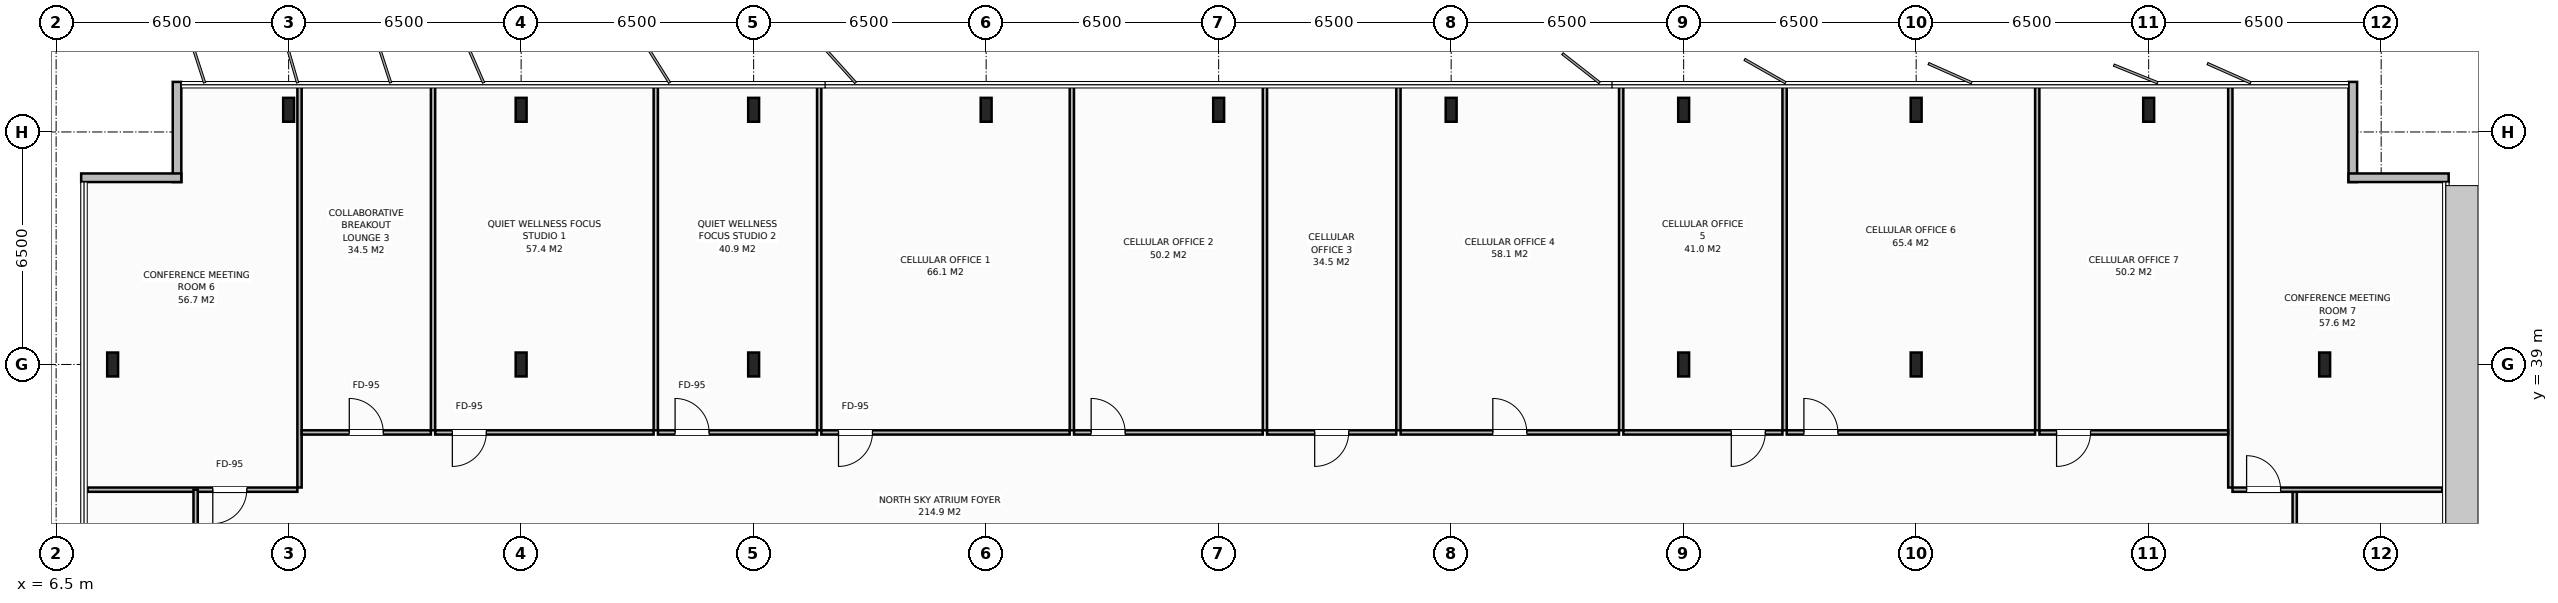
"""IFC4 building model, lengths in metres.
Left out: names, types, materials, properties, quantities, classifications, styles, units other than length and angle.
Written with IfcOpenShell. Run it as: python <this file> out.ifc"""

import sys

from ifc_helpers import new_model, si_unit, direction, frame, frame_2d, origin, origin_2d, place, context, subcontext, project, spatial, rectangle, i_section, extrude, element, fill, save


model = new_model("IFC4")
c1 = context("Model", 3, precision=1e-05, world=origin(), true_north=direction((0.0, 1.0)))
c2 = subcontext(c1, "Body", "Model", "MODEL_VIEW")
j1 = project(units=[si_unit("LENGTHUNIT", "METRE"), si_unit("PLANEANGLEUNIT", "RADIAN")], contexts=[c1])
p1 = place(None, origin())
s1 = spatial("IfcSite", under=j1, at=p1, CompositionType="ELEMENT")
p2 = place(p1, origin())
s2 = spatial("IfcBuilding", under=s1, at=p2, CompositionType="ELEMENT")
p3 = place(p2, frame((0.0, 0.0, 290.4)))
s3 = spatial("IfcBuildingStorey", under=s2, at=p3, CompositionType="ELEMENT", Elevation=290.4)
for number, where, z_axis, x_axis in (
    (1, (19.5, 39.0, 0.0), (0.0, 0.0, 1.0), (1.0, 0.0, 0.0)),
    (2, (58.5, 39.0, 0.0), (0.0, 0.0, 1.0), (1.0, 0.0, 0.0)),
    (3, (26.0, 39.0, 0.0), (0.0, 0.0, 1.0), (1.0, 0.0, 0.0)),
    (4, (52.0, 39.0, 0.0), (0.0, 0.0, 1.0), (1.0, 0.0, 0.0)),
    (5, (13.0, 46.12, 0.0), (0.0, 0.0, 1.0), (1.0, 0.0, 0.0)),
    (6, (19.5, 46.12, 0.0), (0.0, 0.0, 1.0), (1.0, 0.0, 0.0)),
    (7, (26.0, 46.12, 0.0), (0.0, 0.0, 1.0), (1.0, 0.0, 0.0)),
    (8, (32.5, 46.12, 0.0), (0.0, 0.0, 1.0), (1.0, 0.0, 0.0)),
    (9, (39.0, 46.12, 0.0), (0.0, 0.0, 1.0), (1.0, 0.0, 0.0)),
    (10, (45.5, 46.12, 0.0), (0.0, 0.0, 1.0), (1.0, 0.0, 0.0)),
    (11, (52.0, 46.12, 0.0), (0.0, 0.0, 1.0), (1.0, 0.0, 0.0)),
    (12, (58.5, 46.12, 0.0), (0.0, 0.0, 1.0), (1.0, 0.0, 0.0)),
    (13, (65.0, 46.12, 0.0), (0.0, 0.0, 1.0), (1.0, 0.0, 0.0)),
    (14, (8.08, 39.0, 0.0), (0.0, 0.0, 1.0), (1.0, 0.0, 0.0)),
    (15, (69.92, 39.0, 0.0), (0.0, 0.0, 1.0), (1.0, 0.0, 0.0)),
):
    element("IfcColumn", number, at=place(p3, frame(where, z_axis=z_axis, x_axis=x_axis)), inside=s3, PredefinedType="COLUMN", context=c2, shape_type="SweptSolid", body=[
        extrude(i_section(OverallWidth=0.305, OverallDepth=0.668, WebThickness=0.021, FlangeThickness=0.04, at=origin_2d()), origin(), (0.0, 0.0, 1.0), 4.0),
    ])
p4 = place(p3, frame((9.88, 44.1, 0.0), z_axis=(0.0, 0.0, 1.0), x_axis=(0.0, 1.0, 0.0)))
e16 = element("IfcWall", 16, at=p4, inside=s3, PredefinedType="STANDARD", context=c2, shape_type="SweptSolid", body=[
    extrude(rectangle(XDim=2.8, YDim=0.24, at=frame_2d((1.4, 0.0))), origin(), (0.0, 0.0, 1.0), 3.788),
])
p5 = place(p3, frame((7.2, 44.22, 0.0), z_axis=(0.0, 0.0, 1.0), x_axis=(1.0, 0.0, 0.0)))
e17 = element("IfcWall", 17, at=p5, inside=s3, PredefinedType="STANDARD", context=c2, shape_type="SweptSolid", body=[
    extrude(rectangle(XDim=2.8, YDim=0.24, at=frame_2d((1.4, 0.0))), origin(), (0.0, 0.0, 1.0), 3.788),
])
for number, where, z_axis, x_axis in (
    (18, (70.707, 46.9, 0.0), (0.0, 0.0, 1.0), (0.0, -1.0, 0.0)),
    (19, (70.587, 44.22, 0.0), (0.0, 0.0, 1.0), (1.0, 0.0, 0.0)),
):
    element("IfcWall", number, at=place(p3, frame(where, z_axis=z_axis, x_axis=x_axis)), inside=s3, PredefinedType="STANDARD", context=c2, shape_type="SweptSolid", body=[
        extrude(rectangle(XDim=2.8, YDim=0.24, at=frame_2d((1.4, 0.0))), origin(), (0.0, 0.0, 1.0), 3.788),
    ])
p6 = place(p3, frame((69.083, 33.4, 0.0), z_axis=(0.0, 0.0, 1.0), x_axis=(0.0, 1.0, 0.0)))
e20 = element("IfcWall", 20, at=p6, inside=s3, PredefinedType="PARTITIONING", context=c2, shape_type="SweptSolid", body=[
    extrude(rectangle(XDim=2.1, YDim=0.12, at=frame_2d((1.05, 0.0))), origin(), (0.0, 0.0, 1.0), 3.788),
])
p7 = place(p3, frame((13.304, 35.56, 0.0), z_axis=(0.0, 0.0, 1.0), x_axis=(0.0, 1.0, 0.0)))
e21 = element("IfcWall", 21, at=p7, inside=s3, PredefinedType="PARTITIONING", context=c2, shape_type="SweptSolid", body=[
    extrude(rectangle(XDim=11.32, YDim=0.12, at=frame_2d((5.66, 0.0))), origin(), (0.0, 0.0, 1.0), 3.788),
])
p8 = place(p3, frame((7.38, 35.5, 0.0), z_axis=(0.0, 0.0, 1.0), x_axis=(1.0, 0.0, 0.0)))
e22 = element("IfcWall", 22, at=p8, inside=s3, PredefinedType="PARTITIONING", context=c2, shape_type="SweptSolid", body=[
    extrude(rectangle(XDim=5.865, YDim=0.12, at=frame_2d((2.932, 0.0))), origin(), (0.0, 0.0, 1.0), 3.788),
])
p9 = place(p8, frame((3.5, 0.0, 0.0)))
e23 = element("IfcOpeningElement", 23, at=p9, cuts=e22, PredefinedType="OPENING", context=c2, shape_type="SweptSolid", body=[
    extrude(rectangle(XDim=0.95, YDim=2.15, at=frame_2d((0.475, 1.075))), frame((0.0, 0.07, 0.0), z_axis=(0.0, -1.0, 0.0), x_axis=(1.0, 0.0, 0.0)), (0.0, 0.0, 1.0), 0.14),
])
p10 = place(p3, frame((17.037, 37.16, 0.0), z_axis=(0.0, 0.0, 1.0), x_axis=(0.0, 1.0, 0.0)))
e24 = element("IfcWall", 24, at=p10, inside=s3, PredefinedType="PARTITIONING", context=c2, shape_type="SweptSolid", body=[
    extrude(rectangle(XDim=9.72, YDim=0.12, at=frame_2d((4.86, 0.0))), origin(), (0.0, 0.0, 1.0), 3.788),
])
p11 = place(p3, frame((13.365, 37.1, 0.0), z_axis=(0.0, 0.0, 1.0), x_axis=(1.0, 0.0, 0.0)))
e25 = element("IfcWall", 25, at=p11, inside=s3, PredefinedType="PARTITIONING", context=c2, shape_type="SweptSolid", body=[
    extrude(rectangle(XDim=3.612, YDim=0.12, at=frame_2d((1.806, 0.0))), origin(), (0.0, 0.0, 1.0), 3.788),
])
p12 = place(p11, frame((1.331, 0.0, 0.0)))
e26 = element("IfcOpeningElement", 26, at=p12, cuts=e25, PredefinedType="OPENING", context=c2, shape_type="SweptSolid", body=[
    extrude(rectangle(XDim=0.95, YDim=2.15, at=frame_2d((0.475, 1.075))), frame((0.0, 0.07, 0.0), z_axis=(0.0, -1.0, 0.0), x_axis=(1.0, 0.0, 0.0)), (0.0, 0.0, 1.0), 0.14),
])
p13 = place(p3, frame((23.264, 37.16, 0.0), z_axis=(0.0, 0.0, 1.0), x_axis=(0.0, 1.0, 0.0)))
e27 = element("IfcWall", 27, at=p13, inside=s3, PredefinedType="PARTITIONING", context=c2, shape_type="SweptSolid", body=[
    extrude(rectangle(XDim=9.72, YDim=0.12, at=frame_2d((4.86, 0.0))), origin(), (0.0, 0.0, 1.0), 3.788),
])
p14 = place(p3, frame((17.097, 37.1, 0.0), z_axis=(0.0, 0.0, 1.0), x_axis=(1.0, 0.0, 0.0)))
e28 = element("IfcWall", 28, at=p14, inside=s3, PredefinedType="PARTITIONING", context=c2, shape_type="SweptSolid", body=[
    extrude(rectangle(XDim=6.107, YDim=0.12, at=frame_2d((3.054, 0.0))), origin(), (0.0, 0.0, 1.0), 3.788),
])
p15 = place(p14, frame((0.48, 0.0, 0.0)))
e29 = element("IfcOpeningElement", 29, at=p15, cuts=e28, PredefinedType="OPENING", context=c2, shape_type="SweptSolid", body=[
    extrude(rectangle(XDim=0.95, YDim=2.15, at=frame_2d((0.475, 1.075))), frame((0.0, 0.07, 0.0), z_axis=(0.0, -1.0, 0.0), x_axis=(1.0, 0.0, 0.0)), (0.0, 0.0, 1.0), 0.14),
])
p16 = place(p3, frame((27.833, 37.16, 0.0), z_axis=(0.0, 0.0, 1.0), x_axis=(0.0, 1.0, 0.0)))
e30 = element("IfcWall", 30, at=p16, inside=s3, PredefinedType="PARTITIONING", context=c2, shape_type="SweptSolid", body=[
    extrude(rectangle(XDim=9.72, YDim=0.12, at=frame_2d((4.86, 0.0))), origin(), (0.0, 0.0, 1.0), 3.788),
])
p17 = place(p3, frame((23.324, 37.1, 0.0), z_axis=(0.0, 0.0, 1.0), x_axis=(1.0, 0.0, 0.0)))
e31 = element("IfcWall", 31, at=p17, inside=s3, PredefinedType="PARTITIONING", context=c2, shape_type="SweptSolid", body=[
    extrude(rectangle(XDim=4.448, YDim=0.12, at=frame_2d((2.224, 0.0))), origin(), (0.0, 0.0, 1.0), 3.788),
])
p18 = place(p17, frame((0.48, 0.0, 0.0)))
e32 = element("IfcOpeningElement", 32, at=p18, cuts=e31, PredefinedType="OPENING", context=c2, shape_type="SweptSolid", body=[
    extrude(rectangle(XDim=0.95, YDim=2.15, at=frame_2d((0.475, 1.075))), frame((0.0, 0.07, 0.0), z_axis=(0.0, -1.0, 0.0), x_axis=(1.0, 0.0, 0.0)), (0.0, 0.0, 1.0), 0.14),
])
p19 = place(p3, frame((34.896, 37.16, 0.0), z_axis=(0.0, 0.0, 1.0), x_axis=(0.0, 1.0, 0.0)))
e33 = element("IfcWall", 33, at=p19, inside=s3, PredefinedType="PARTITIONING", context=c2, shape_type="SweptSolid", body=[
    extrude(rectangle(XDim=9.72, YDim=0.12, at=frame_2d((4.86, 0.0))), origin(), (0.0, 0.0, 1.0), 3.788),
])
p20 = place(p3, frame((27.893, 37.1, 0.0), z_axis=(0.0, 0.0, 1.0), x_axis=(1.0, 0.0, 0.0)))
e34 = element("IfcWall", 34, at=p20, inside=s3, PredefinedType="PARTITIONING", context=c2, shape_type="SweptSolid", body=[
    extrude(rectangle(XDim=6.943, YDim=0.12, at=frame_2d((3.472, 0.0))), origin(), (0.0, 0.0, 1.0), 3.788),
])
p21 = place(p20, frame((0.48, 0.0, 0.0)))
e35 = element("IfcOpeningElement", 35, at=p21, cuts=e34, PredefinedType="OPENING", context=c2, shape_type="SweptSolid", body=[
    extrude(rectangle(XDim=0.95, YDim=2.15, at=frame_2d((0.475, 1.075))), frame((0.0, 0.07, 0.0), z_axis=(0.0, -1.0, 0.0), x_axis=(1.0, 0.0, 0.0)), (0.0, 0.0, 1.0), 0.14),
])
p22 = place(p3, frame((40.294, 37.16, 0.0), z_axis=(0.0, 0.0, 1.0), x_axis=(0.0, 1.0, 0.0)))
e36 = element("IfcWall", 36, at=p22, inside=s3, PredefinedType="PARTITIONING", context=c2, shape_type="SweptSolid", body=[
    extrude(rectangle(XDim=9.72, YDim=0.12, at=frame_2d((4.86, 0.0))), origin(), (0.0, 0.0, 1.0), 3.788),
])
p23 = place(p3, frame((34.956, 37.1, 0.0), z_axis=(0.0, 0.0, 1.0), x_axis=(1.0, 0.0, 0.0)))
e37 = element("IfcWall", 37, at=p23, inside=s3, PredefinedType="PARTITIONING", context=c2, shape_type="SweptSolid", body=[
    extrude(rectangle(XDim=5.278, YDim=0.12, at=frame_2d((2.639, 0.0))), origin(), (0.0, 0.0, 1.0), 3.788),
])
p24 = place(p23, frame((0.48, 0.0, 0.0)))
e38 = element("IfcOpeningElement", 38, at=p24, cuts=e37, PredefinedType="OPENING", context=c2, shape_type="SweptSolid", body=[
    extrude(rectangle(XDim=0.95, YDim=2.15, at=frame_2d((0.475, 1.075))), frame((0.0, 0.07, 0.0), z_axis=(0.0, -1.0, 0.0), x_axis=(1.0, 0.0, 0.0)), (0.0, 0.0, 1.0), 0.14),
])
p25 = place(p3, frame((44.026, 37.16, 0.0), z_axis=(0.0, 0.0, 1.0), x_axis=(0.0, 1.0, 0.0)))
e39 = element("IfcWall", 39, at=p25, inside=s3, PredefinedType="PARTITIONING", context=c2, shape_type="SweptSolid", body=[
    extrude(rectangle(XDim=9.72, YDim=0.12, at=frame_2d((4.86, 0.0))), origin(), (0.0, 0.0, 1.0), 3.788),
])
p26 = place(p3, frame((40.354, 37.1, 0.0), z_axis=(0.0, 0.0, 1.0), x_axis=(1.0, 0.0, 0.0)))
e40 = element("IfcWall", 40, at=p26, inside=s3, PredefinedType="PARTITIONING", context=c2, shape_type="SweptSolid", body=[
    extrude(rectangle(XDim=3.612, YDim=0.12, at=frame_2d((1.806, 0.0))), origin(), (0.0, 0.0, 1.0), 3.788),
])
p27 = place(p26, frame((1.331, 0.0, 0.0)))
e41 = element("IfcOpeningElement", 41, at=p27, cuts=e40, PredefinedType="OPENING", context=c2, shape_type="SweptSolid", body=[
    extrude(rectangle(XDim=0.95, YDim=2.15, at=frame_2d((0.475, 1.075))), frame((0.0, 0.07, 0.0), z_axis=(0.0, -1.0, 0.0), x_axis=(1.0, 0.0, 0.0)), (0.0, 0.0, 1.0), 0.14),
])
p28 = place(p3, frame((50.253, 37.16, 0.0), z_axis=(0.0, 0.0, 1.0), x_axis=(0.0, 1.0, 0.0)))
e42 = element("IfcWall", 42, at=p28, inside=s3, PredefinedType="PARTITIONING", context=c2, shape_type="SweptSolid", body=[
    extrude(rectangle(XDim=9.72, YDim=0.12, at=frame_2d((4.86, 0.0))), origin(), (0.0, 0.0, 1.0), 3.788),
])
p29 = place(p3, frame((44.086, 37.1, 0.0), z_axis=(0.0, 0.0, 1.0), x_axis=(1.0, 0.0, 0.0)))
e43 = element("IfcWall", 43, at=p29, inside=s3, PredefinedType="PARTITIONING", context=c2, shape_type="SweptSolid", body=[
    extrude(rectangle(XDim=6.107, YDim=0.12, at=frame_2d((3.054, 0.0))), origin(), (0.0, 0.0, 1.0), 3.788),
])
p30 = place(p29, frame((2.579, 0.0, 0.0)))
e44 = element("IfcOpeningElement", 44, at=p30, cuts=e43, PredefinedType="OPENING", context=c2, shape_type="SweptSolid", body=[
    extrude(rectangle(XDim=0.95, YDim=2.15, at=frame_2d((0.475, 1.075))), frame((0.0, 0.07, 0.0), z_axis=(0.0, -1.0, 0.0), x_axis=(1.0, 0.0, 0.0)), (0.0, 0.0, 1.0), 0.14),
])
p31 = place(p3, frame((54.822, 37.16, 0.0), z_axis=(0.0, 0.0, 1.0), x_axis=(0.0, 1.0, 0.0)))
e45 = element("IfcWall", 45, at=p31, inside=s3, PredefinedType="PARTITIONING", context=c2, shape_type="SweptSolid", body=[
    extrude(rectangle(XDim=9.72, YDim=0.12, at=frame_2d((4.86, 0.0))), origin(), (0.0, 0.0, 1.0), 3.788),
])
p32 = place(p3, frame((50.313, 37.1, 0.0), z_axis=(0.0, 0.0, 1.0), x_axis=(1.0, 0.0, 0.0)))
e46 = element("IfcWall", 46, at=p32, inside=s3, PredefinedType="PARTITIONING", context=c2, shape_type="SweptSolid", body=[
    extrude(rectangle(XDim=4.448, YDim=0.12, at=frame_2d((2.224, 0.0))), origin(), (0.0, 0.0, 1.0), 3.788),
])
p33 = place(p32, frame((3.018, 0.0, 0.0)))
e47 = element("IfcOpeningElement", 47, at=p33, cuts=e46, PredefinedType="OPENING", context=c2, shape_type="SweptSolid", body=[
    extrude(rectangle(XDim=0.95, YDim=2.15, at=frame_2d((0.475, 1.075))), frame((0.0, 0.07, 0.0), z_axis=(0.0, -1.0, 0.0), x_axis=(1.0, 0.0, 0.0)), (0.0, 0.0, 1.0), 0.14),
])
p34 = place(p3, frame((61.885, 37.16, 0.0), z_axis=(0.0, 0.0, 1.0), x_axis=(0.0, 1.0, 0.0)))
e48 = element("IfcWall", 48, at=p34, inside=s3, PredefinedType="PARTITIONING", context=c2, shape_type="SweptSolid", body=[
    extrude(rectangle(XDim=9.72, YDim=0.12, at=frame_2d((4.86, 0.0))), origin(), (0.0, 0.0, 1.0), 3.788),
])
p35 = place(p3, frame((54.882, 37.1, 0.0), z_axis=(0.0, 0.0, 1.0), x_axis=(1.0, 0.0, 0.0)))
e49 = element("IfcWall", 49, at=p35, inside=s3, PredefinedType="PARTITIONING", context=c2, shape_type="SweptSolid", body=[
    extrude(rectangle(XDim=6.943, YDim=0.12, at=frame_2d((3.472, 0.0))), origin(), (0.0, 0.0, 1.0), 3.788),
])
p36 = place(p35, frame((0.48, 0.0, 0.0)))
e50 = element("IfcOpeningElement", 50, at=p36, cuts=e49, PredefinedType="OPENING", context=c2, shape_type="SweptSolid", body=[
    extrude(rectangle(XDim=0.95, YDim=2.15, at=frame_2d((0.475, 1.075))), frame((0.0, 0.07, 0.0), z_axis=(0.0, -1.0, 0.0), x_axis=(1.0, 0.0, 0.0)), (0.0, 0.0, 1.0), 0.14),
])
p37 = place(p3, frame((67.283, 35.56, 0.0), z_axis=(0.0, 0.0, 1.0), x_axis=(0.0, 1.0, 0.0)))
e51 = element("IfcWall", 51, at=p37, inside=s3, PredefinedType="PARTITIONING", context=c2, shape_type="SweptSolid", body=[
    extrude(rectangle(XDim=11.32, YDim=0.12, at=frame_2d((5.66, 0.0))), origin(), (0.0, 0.0, 1.0), 3.788),
])
p38 = place(p3, frame((61.945, 37.1, 0.0), z_axis=(0.0, 0.0, 1.0), x_axis=(1.0, 0.0, 0.0)))
e52 = element("IfcWall", 52, at=p38, inside=s3, PredefinedType="PARTITIONING", context=c2, shape_type="SweptSolid", body=[
    extrude(rectangle(XDim=5.278, YDim=0.12, at=frame_2d((2.639, 0.0))), origin(), (0.0, 0.0, 1.0), 3.788),
])
p39 = place(p38, frame((0.48, 0.0, 0.0)))
e53 = element("IfcOpeningElement", 53, at=p39, cuts=e52, PredefinedType="OPENING", context=c2, shape_type="SweptSolid", body=[
    extrude(rectangle(XDim=0.95, YDim=2.15, at=frame_2d((0.475, 1.075))), frame((0.0, 0.07, 0.0), z_axis=(0.0, -1.0, 0.0), x_axis=(1.0, 0.0, 0.0)), (0.0, 0.0, 1.0), 0.14),
])
p40 = place(p3, frame((67.343, 35.5, 0.0), z_axis=(0.0, 0.0, 1.0), x_axis=(1.0, 0.0, 0.0)))
e54 = element("IfcWall", 54, at=p40, inside=s3, PredefinedType="PARTITIONING", context=c2, shape_type="SweptSolid", body=[
    extrude(rectangle(XDim=5.865, YDim=0.12, at=frame_2d((2.932, 0.0))), origin(), (0.0, 0.0, 1.0), 3.788),
])
p41 = place(p40, frame((0.395, 0.0, 0.0)))
e55 = element("IfcOpeningElement", 55, at=p41, cuts=e54, PredefinedType="OPENING", context=c2, shape_type="SweptSolid", body=[
    extrude(rectangle(XDim=0.95, YDim=2.15, at=frame_2d((0.475, 1.075))), frame((0.0, 0.07, 0.0), z_axis=(0.0, -1.0, 0.0), x_axis=(1.0, 0.0, 0.0)), (0.0, 0.0, 1.0), 0.14),
])
p42 = place(p3, frame((10.4, 29.167, 0.0), z_axis=(0.0, 0.0, 1.0), x_axis=(0.0, 1.0, 0.0)))
e56 = element("IfcWall", 56, at=p42, inside=s3, PredefinedType="PARTITIONING", context=c2, shape_type="SweptSolid", body=[
    extrude(rectangle(XDim=6.333, YDim=0.12, at=frame_2d((3.167, 0.0))), origin(), (0.0, 0.0, 1.0), 3.788),
])
p43 = place(p42, frame((1.642, 0.0, 0.0)))
e57 = element("IfcOpeningElement", 57, at=p43, cuts=e56, PredefinedType="OPENING", context=c2, shape_type="SweptSolid", body=[
    extrude(rectangle(XDim=0.95, YDim=2.15, at=frame_2d((0.475, 1.075))), frame((0.0, 0.07, 0.0), z_axis=(0.0, -1.0, 0.0), x_axis=(1.0, 0.0, 0.0)), (0.0, 0.0, 1.0), 0.14),
])
p44 = place(p9, origin())
e58 = element("IfcDoor", 58, at=p44, inside=s3, OperationType="SINGLE_SWING_RIGHT", PredefinedType="DOOR", context=c2, shape_type="SweptSolid", body=[
    extrude(rectangle(XDim=0.95, YDim=2.15, at=frame_2d((0.475, 1.075))), frame((0.0, 0.025, 0.0), z_axis=(0.0, -1.0, 0.0), x_axis=(1.0, 0.0, 0.0)), (0.0, 0.0, 1.0), 0.05),
])
fill(e23, e58)
p45 = place(p12, origin())
e59 = element("IfcDoor", 59, at=p45, inside=s3, OperationType="SINGLE_SWING_LEFT", PredefinedType="DOOR", context=c2, shape_type="SweptSolid", body=[
    extrude(rectangle(XDim=0.95, YDim=2.15, at=frame_2d((0.475, 1.075))), frame((0.0, 0.025, 0.0), z_axis=(0.0, -1.0, 0.0), x_axis=(1.0, 0.0, 0.0)), (0.0, 0.0, 1.0), 0.05),
])
fill(e26, e59)
p46 = place(p15, origin())
e60 = element("IfcDoor", 60, at=p46, inside=s3, OperationType="SINGLE_SWING_RIGHT", PredefinedType="DOOR", context=c2, shape_type="SweptSolid", body=[
    extrude(rectangle(XDim=0.95, YDim=2.15, at=frame_2d((0.475, 1.075))), frame((0.0, 0.025, 0.0), z_axis=(0.0, -1.0, 0.0), x_axis=(1.0, 0.0, 0.0)), (0.0, 0.0, 1.0), 0.05),
])
fill(e29, e60)
p47 = place(p18, origin())
e61 = element("IfcDoor", 61, at=p47, inside=s3, OperationType="SINGLE_SWING_LEFT", PredefinedType="DOOR", context=c2, shape_type="SweptSolid", body=[
    extrude(rectangle(XDim=0.95, YDim=2.15, at=frame_2d((0.475, 1.075))), frame((0.0, 0.025, 0.0), z_axis=(0.0, -1.0, 0.0), x_axis=(1.0, 0.0, 0.0)), (0.0, 0.0, 1.0), 0.05),
])
fill(e32, e61)
p48 = place(p21, origin())
e62 = element("IfcDoor", 62, at=p48, inside=s3, OperationType="SINGLE_SWING_RIGHT", PredefinedType="DOOR", context=c2, shape_type="SweptSolid", body=[
    extrude(rectangle(XDim=0.95, YDim=2.15, at=frame_2d((0.475, 1.075))), frame((0.0, 0.025, 0.0), z_axis=(0.0, -1.0, 0.0), x_axis=(1.0, 0.0, 0.0)), (0.0, 0.0, 1.0), 0.05),
])
fill(e35, e62)
p49 = place(p24, origin())
e63 = element("IfcDoor", 63, at=p49, inside=s3, OperationType="SINGLE_SWING_LEFT", PredefinedType="DOOR", context=c2, shape_type="SweptSolid", body=[
    extrude(rectangle(XDim=0.95, YDim=2.15, at=frame_2d((0.475, 1.075))), frame((0.0, 0.025, 0.0), z_axis=(0.0, -1.0, 0.0), x_axis=(1.0, 0.0, 0.0)), (0.0, 0.0, 1.0), 0.05),
])
fill(e38, e63)
p50 = place(p27, origin())
e64 = element("IfcDoor", 64, at=p50, inside=s3, OperationType="SINGLE_SWING_RIGHT", PredefinedType="DOOR", context=c2, shape_type="SweptSolid", body=[
    extrude(rectangle(XDim=0.95, YDim=2.15, at=frame_2d((0.475, 1.075))), frame((0.0, 0.025, 0.0), z_axis=(0.0, -1.0, 0.0), x_axis=(1.0, 0.0, 0.0)), (0.0, 0.0, 1.0), 0.05),
])
fill(e41, e64)
p51 = place(p30, origin())
e65 = element("IfcDoor", 65, at=p51, inside=s3, OperationType="SINGLE_SWING_LEFT", PredefinedType="DOOR", context=c2, shape_type="SweptSolid", body=[
    extrude(rectangle(XDim=0.95, YDim=2.15, at=frame_2d((0.475, 1.075))), frame((0.0, 0.025, 0.0), z_axis=(0.0, -1.0, 0.0), x_axis=(1.0, 0.0, 0.0)), (0.0, 0.0, 1.0), 0.05),
])
fill(e44, e65)
p52 = place(p33, origin())
e66 = element("IfcDoor", 66, at=p52, inside=s3, OperationType="SINGLE_SWING_RIGHT", PredefinedType="DOOR", context=c2, shape_type="SweptSolid", body=[
    extrude(rectangle(XDim=0.95, YDim=2.15, at=frame_2d((0.475, 1.075))), frame((0.0, 0.025, 0.0), z_axis=(0.0, -1.0, 0.0), x_axis=(1.0, 0.0, 0.0)), (0.0, 0.0, 1.0), 0.05),
])
fill(e47, e66)
p53 = place(p36, origin())
e67 = element("IfcDoor", 67, at=p53, inside=s3, OperationType="SINGLE_SWING_LEFT", PredefinedType="DOOR", context=c2, shape_type="SweptSolid", body=[
    extrude(rectangle(XDim=0.95, YDim=2.15, at=frame_2d((0.475, 1.075))), frame((0.0, 0.025, 0.0), z_axis=(0.0, -1.0, 0.0), x_axis=(1.0, 0.0, 0.0)), (0.0, 0.0, 1.0), 0.05),
])
fill(e50, e67)
p54 = place(p39, origin())
e68 = element("IfcDoor", 68, at=p54, inside=s3, OperationType="SINGLE_SWING_RIGHT", PredefinedType="DOOR", context=c2, shape_type="SweptSolid", body=[
    extrude(rectangle(XDim=0.95, YDim=2.15, at=frame_2d((0.475, 1.075))), frame((0.0, 0.025, 0.0), z_axis=(0.0, -1.0, 0.0), x_axis=(1.0, 0.0, 0.0)), (0.0, 0.0, 1.0), 0.05),
])
fill(e53, e68)
p55 = place(p41, origin())
e69 = element("IfcDoor", 69, at=p55, inside=s3, OperationType="SINGLE_SWING_LEFT", PredefinedType="DOOR", context=c2, shape_type="SweptSolid", body=[
    extrude(rectangle(XDim=0.95, YDim=2.15, at=frame_2d((0.475, 1.075))), frame((0.0, 0.025, 0.0), z_axis=(0.0, -1.0, 0.0), x_axis=(1.0, 0.0, 0.0)), (0.0, 0.0, 1.0), 0.05),
])
fill(e55, e69)
save(model, sys.argv[1])
